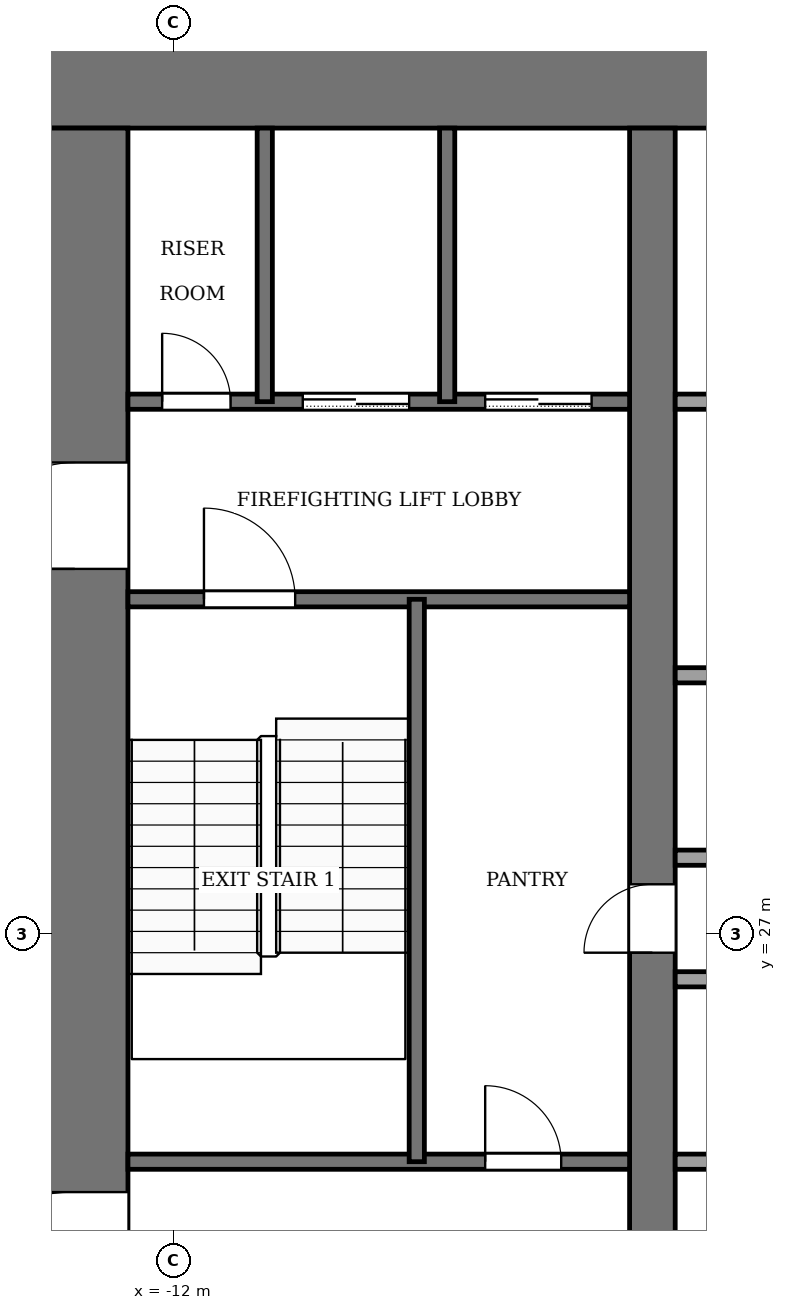
"""IFC4 building model, lengths in metres.
Left out: names, types, materials, properties, quantities, classifications, styles, units other than length and angle.
Written with IfcOpenShell. Run it as: python <this file> out.ifc"""

import sys

from ifc_helpers import new_model, si_unit, direction, frame, frame_2d, origin, place, context, subcontext, project, spatial, rectangle, extrude, element, fill, save


model = new_model("IFC4")
c1 = context("Model", 3, precision=1e-05, world=origin(), true_north=direction((0.0, 1.0)))
c2 = subcontext(c1, "Body", "Model", "MODEL_VIEW")
j1 = project(units=[si_unit("LENGTHUNIT", "METRE"), si_unit("PLANEANGLEUNIT", "RADIAN")], contexts=[c1])
p1 = place(None, origin())
s1 = spatial("IfcSite", under=j1, at=p1, CompositionType="ELEMENT")
p2 = place(p1, origin())
s2 = spatial("IfcBuilding", under=s1, at=p2, CompositionType="ELEMENT")
p3 = place(p2, frame((0.0, 0.0, 42.0)))
s3 = spatial("IfcBuildingStorey", under=s2, at=p3, CompositionType="ELEMENT", Elevation=42.0)
p4 = place(p3, frame((-14.0, 38.3, -0.13), z_axis=(0.0, 0.0, 1.0), x_axis=(1.0, 0.0, 0.0)))
e1 = element("IfcWall", 1, at=p4, inside=s3, PredefinedType="SHEAR", context=c2, shape_type="SweptSolid", body=[
    extrude(rectangle(XDim=28.0, YDim=1.4, at=frame_2d((14.0, 0.0))), origin(), (0.0, 0.0, 1.0), 4.0),
])
p5 = place(p3, frame((-13.3, 18.4, -0.13), z_axis=(0.0, 0.0, 1.0), x_axis=(0.0, 1.0, 0.0)))
e2 = element("IfcWall", 2, at=p5, inside=s3, PredefinedType="SHEAR", context=c2, shape_type="SweptSolid", body=[
    extrude(rectangle(XDim=19.2, YDim=1.4, at=frame_2d((9.6, 0.0))), origin(), (0.0, 0.0, 1.0), 4.0),
])
p6 = place(p5, frame((2.8, 0.0, 0.13)))
e3 = element("IfcOpeningElement", 3, at=p6, cuts=e2, PredefinedType="OPENING", context=c2, shape_type="SweptSolid", body=[
    extrude(rectangle(XDim=2.4, YDim=2.4, at=frame_2d((1.2, 1.2))), frame((0.0, 0.71, 0.0), z_axis=(0.0, -1.0, 0.0), x_axis=(1.0, 0.0, 0.0)), (0.0, 0.0, 1.0), 1.42),
])
p7 = place(p5, frame((13.4, 0.0, 0.13)))
e4 = element("IfcOpeningElement", 4, at=p7, cuts=e2, PredefinedType="OPENING", context=c2, shape_type="SweptSolid", body=[
    extrude(rectangle(XDim=1.4, YDim=2.2, at=frame_2d((0.7, 1.1))), frame((0.0, 0.71, 0.0), z_axis=(0.0, -1.0, 0.0), x_axis=(1.0, 0.0, 0.0)), (0.0, 0.0, 1.0), 1.42),
])
p8 = place(p3, frame((-5.7, 18.4, -0.13), z_axis=(0.0, 0.0, 1.0), x_axis=(0.0, 1.0, 0.0)))
e5 = element("IfcWall", 5, at=p8, inside=s3, PredefinedType="SHEAR", context=c2, shape_type="SweptSolid", body=[
    extrude(rectangle(XDim=19.2, YDim=0.6, at=frame_2d((9.6, 0.0))), origin(), (0.0, 0.0, 1.0), 4.0),
])
p9 = place(p8, frame((8.35, 0.0, 0.13)))
e6 = element("IfcOpeningElement", 6, at=p9, cuts=e5, PredefinedType="OPENING", context=c2, shape_type="SweptSolid", body=[
    extrude(rectangle(XDim=0.9, YDim=2.1, at=frame_2d((0.45, 1.05))), frame((0.0, 0.31, 0.0), z_axis=(0.0, -1.0, 0.0), x_axis=(1.0, 0.0, 0.0)), (0.0, 0.0, 1.0), 0.62),
])
p10 = place(p3, frame((-12.6, 24.0, 0.0), z_axis=(0.0, 0.0, 1.0), x_axis=(1.0, 0.0, 0.0)))
e7 = element("IfcWall", 7, at=p10, inside=s3, PredefinedType="PARTITIONING", context=c2, shape_type="SweptSolid", body=[
    extrude(rectangle(XDim=6.6, YDim=0.2, at=frame_2d((3.3, 0.0))), origin(), (0.0, 0.0, 1.0), 3.87),
])
p11 = place(p10, frame((4.7, 0.0, 0.0)))
e8 = element("IfcOpeningElement", 8, at=p11, cuts=e7, PredefinedType="OPENING", context=c2, shape_type="SweptSolid", body=[
    extrude(rectangle(XDim=1.0, YDim=2.1, at=frame_2d((0.5, 1.05))), frame((0.0, 0.11, 0.0), z_axis=(0.0, -1.0, 0.0), x_axis=(1.0, 0.0, 0.0)), (0.0, 0.0, 1.0), 0.22),
])
p12 = place(p3, frame((-5.4, 24.0, 0.0), z_axis=(0.0, 0.0, 1.0), x_axis=(1.0, 0.0, 0.0)))
e9 = element("IfcWall", 9, at=p12, inside=s3, PredefinedType="PARTITIONING", context=c2, shape_type="SweptSolid", body=[
    extrude(rectangle(XDim=10.8, YDim=0.2, at=frame_2d((5.4, 0.0))), origin(), (0.0, 0.0, 1.0), 3.87),
])
p13 = place(p12, frame((0.75, 0.0, 0.0)))
e10 = element("IfcOpeningElement", 10, at=p13, cuts=e9, PredefinedType="OPENING", context=c2, shape_type="SweptSolid", body=[
    extrude(rectangle(XDim=1.2, YDim=2.2, at=frame_2d((0.6, 1.1))), frame((0.0, 0.11, 0.0), z_axis=(0.0, -1.0, 0.0), x_axis=(1.0, 0.0, 0.0)), (0.0, 0.0, 1.0), 0.22),
])
p14 = place(p12, frame((3.45, 0.0, 0.0)))
e11 = element("IfcOpeningElement", 11, at=p14, cuts=e9, PredefinedType="OPENING", context=c2, shape_type="SweptSolid", body=[
    extrude(rectangle(XDim=1.2, YDim=2.2, at=frame_2d((0.6, 1.1))), frame((0.0, 0.11, 0.0), z_axis=(0.0, -1.0, 0.0), x_axis=(1.0, 0.0, 0.0)), (0.0, 0.0, 1.0), 0.22),
])
p15 = place(p12, frame((6.15, 0.0, 0.0)))
e12 = element("IfcOpeningElement", 12, at=p15, cuts=e9, PredefinedType="OPENING", context=c2, shape_type="SweptSolid", body=[
    extrude(rectangle(XDim=1.2, YDim=2.2, at=frame_2d((0.6, 1.1))), frame((0.0, 0.11, 0.0), z_axis=(0.0, -1.0, 0.0), x_axis=(1.0, 0.0, 0.0)), (0.0, 0.0, 1.0), 0.22),
])
p16 = place(p12, frame((8.85, 0.0, 0.0)))
e13 = element("IfcOpeningElement", 13, at=p16, cuts=e9, PredefinedType="OPENING", context=c2, shape_type="SweptSolid", body=[
    extrude(rectangle(XDim=1.2, YDim=2.2, at=frame_2d((0.6, 1.1))), frame((0.0, 0.11, 0.0), z_axis=(0.0, -1.0, 0.0), x_axis=(1.0, 0.0, 0.0)), (0.0, 0.0, 1.0), 0.22),
])
for number, where, z_axis, x_axis in (
    (14, (-5.4, 26.4, 0.0), (0.0, 0.0, 1.0), (1.0, 0.0, 0.0)),
    (15, (-5.4, 28.0, 0.0), (0.0, 0.0, 1.0), (1.0, 0.0, 0.0)),
    (16, (-5.4, 30.4, 0.0), (0.0, 0.0, 1.0), (1.0, 0.0, 0.0)),
):
    element("IfcWall", number, at=place(p3, frame(where, z_axis=z_axis, x_axis=x_axis)), inside=s3, PredefinedType="PARTITIONING", context=c2, shape_type="SweptSolid", body=[
        extrude(rectangle(XDim=10.8, YDim=0.2, at=frame_2d((5.4, 0.0))), origin(), (0.0, 0.0, 1.0), 3.87),
    ])
p17 = place(p3, frame((-12.6, 31.4, 0.0), z_axis=(0.0, 0.0, 1.0), x_axis=(1.0, 0.0, 0.0)))
e17 = element("IfcWall", 17, at=p17, inside=s3, PredefinedType="PARTITIONING", context=c2, shape_type="SweptSolid", body=[
    extrude(rectangle(XDim=6.6, YDim=0.2, at=frame_2d((3.3, 0.0))), origin(), (0.0, 0.0, 1.0), 3.87),
])
p18 = place(p17, frame((1.0, 0.0, 0.0)))
e18 = element("IfcOpeningElement", 18, at=p18, cuts=e17, PredefinedType="OPENING", context=c2, shape_type="SweptSolid", body=[
    extrude(rectangle(XDim=1.2, YDim=2.2, at=frame_2d((0.6, 1.1))), frame((0.0, 0.11, 0.0), z_axis=(0.0, -1.0, 0.0), x_axis=(1.0, 0.0, 0.0)), (0.0, 0.0, 1.0), 0.22),
])
p19 = place(p3, frame((-12.6, 34.0, 0.0), z_axis=(0.0, 0.0, 1.0), x_axis=(1.0, 0.0, 0.0)))
e19 = element("IfcWall", 19, at=p19, inside=s3, PredefinedType="PARTITIONING", context=c2, shape_type="SweptSolid", body=[
    extrude(rectangle(XDim=6.6, YDim=0.2, at=frame_2d((3.3, 0.0))), origin(), (0.0, 0.0, 1.0), 3.87),
])
p20 = place(p19, frame((4.7, 0.0, 0.0)))
e20 = element("IfcOpeningElement", 20, at=p20, cuts=e19, PredefinedType="OPENING", context=c2, shape_type="SweptSolid", body=[
    extrude(rectangle(XDim=1.4, YDim=2.2, at=frame_2d((0.7, 1.1))), frame((0.0, 0.11, 0.0), z_axis=(0.0, -1.0, 0.0), x_axis=(1.0, 0.0, 0.0)), (0.0, 0.0, 1.0), 0.22),
])
p21 = place(p19, frame((2.3, 0.0, 0.0)))
e21 = element("IfcOpeningElement", 21, at=p21, cuts=e19, PredefinedType="OPENING", context=c2, shape_type="SweptSolid", body=[
    extrude(rectangle(XDim=1.4, YDim=2.2, at=frame_2d((0.7, 1.1))), frame((0.0, 0.11, 0.0), z_axis=(0.0, -1.0, 0.0), x_axis=(1.0, 0.0, 0.0)), (0.0, 0.0, 1.0), 0.22),
])
p22 = place(p19, frame((0.45, 0.0, 0.0)))
e22 = element("IfcOpeningElement", 22, at=p22, cuts=e19, PredefinedType="OPENING", context=c2, shape_type="SweptSolid", body=[
    extrude(rectangle(XDim=0.9, YDim=2.1, at=frame_2d((0.45, 1.05))), frame((0.0, 0.11, 0.0), z_axis=(0.0, -1.0, 0.0), x_axis=(1.0, 0.0, 0.0)), (0.0, 0.0, 1.0), 0.22),
])
p23 = place(p3, frame((-5.4, 34.0, 0.0), z_axis=(0.0, 0.0, 1.0), x_axis=(1.0, 0.0, 0.0)))
e23 = element("IfcWall", 23, at=p23, inside=s3, PredefinedType="PARTITIONING", context=c2, shape_type="SweptSolid", body=[
    extrude(rectangle(XDim=10.8, YDim=0.2, at=frame_2d((5.4, 0.0))), origin(), (0.0, 0.0, 1.0), 3.87),
])
p24 = place(p23, frame((6.15, 0.0, 0.0)))
e24 = element("IfcOpeningElement", 24, at=p24, cuts=e23, PredefinedType="OPENING", context=c2, shape_type="SweptSolid", body=[
    extrude(rectangle(XDim=1.2, YDim=2.2, at=frame_2d((0.6, 1.1))), frame((0.0, 0.11, 0.0), z_axis=(0.0, -1.0, 0.0), x_axis=(1.0, 0.0, 0.0)), (0.0, 0.0, 1.0), 0.22),
])
p25 = place(p23, frame((8.95, 0.0, 0.0)))
e25 = element("IfcOpeningElement", 25, at=p25, cuts=e23, PredefinedType="OPENING", context=c2, shape_type="SweptSolid", body=[
    extrude(rectangle(XDim=1.0, YDim=2.1, at=frame_2d((0.5, 1.05))), frame((0.0, 0.11, 0.0), z_axis=(0.0, -1.0, 0.0), x_axis=(1.0, 0.0, 0.0)), (0.0, 0.0, 1.0), 0.22),
])
p26 = place(p3, frame((-10.8, 34.0, 0.0), z_axis=(0.0, 0.0, 1.0), x_axis=(0.0, 1.0, 0.0)))
e26 = element("IfcWall", 26, at=p26, inside=s3, PredefinedType="PARTITIONING", context=c2, shape_type="SweptSolid", body=[
    extrude(rectangle(XDim=3.6, YDim=0.2, at=frame_2d((1.8, 0.0))), origin(), (0.0, 0.0, 1.0), 3.87),
])
p27 = place(p3, frame((-8.8, 24.0, 0.0), z_axis=(0.0, 0.0, 1.0), x_axis=(0.0, 1.0, 0.0)))
e27 = element("IfcWall", 27, at=p27, inside=s3, PredefinedType="PARTITIONING", context=c2, shape_type="SweptSolid", body=[
    extrude(rectangle(XDim=7.4, YDim=0.2, at=frame_2d((3.7, 0.0))), origin(), (0.0, 0.0, 1.0), 3.87),
])
p28 = place(p3, frame((-8.4, 34.0, 0.0), z_axis=(0.0, 0.0, 1.0), x_axis=(0.0, 1.0, 0.0)))
e28 = element("IfcWall", 28, at=p28, inside=s3, PredefinedType="PARTITIONING", context=c2, shape_type="SweptSolid", body=[
    extrude(rectangle(XDim=3.6, YDim=0.2, at=frame_2d((1.8, 0.0))), origin(), (0.0, 0.0, 1.0), 3.87),
])
p29 = place(p20, origin())
e29 = element("IfcDoor", 29, at=p29, inside=s3, OperationType="SLIDING_TO_LEFT", PredefinedType="DOOR", context=c2, shape_type="SweptSolid", body=[
    extrude(rectangle(XDim=1.4, YDim=2.2, at=frame_2d((0.7, 1.1))), frame((0.0, 0.025, 0.0), z_axis=(0.0, -1.0, 0.0), x_axis=(1.0, 0.0, 0.0)), (0.0, 0.0, 1.0), 0.05),
])
fill(e20, e29)
p30 = place(p21, origin())
e30 = element("IfcDoor", 30, at=p30, inside=s3, OperationType="SLIDING_TO_LEFT", PredefinedType="DOOR", context=c2, shape_type="SweptSolid", body=[
    extrude(rectangle(XDim=1.4, YDim=2.2, at=frame_2d((0.7, 1.1))), frame((0.0, 0.025, 0.0), z_axis=(0.0, -1.0, 0.0), x_axis=(1.0, 0.0, 0.0)), (0.0, 0.0, 1.0), 0.05),
])
fill(e21, e30)
p31 = place(p22, origin())
e31 = element("IfcDoor", 31, at=p31, inside=s3, OperationType="SINGLE_SWING_RIGHT", PredefinedType="DOOR", context=c2, shape_type="SweptSolid", body=[
    extrude(rectangle(XDim=0.9, YDim=2.1, at=frame_2d((0.45, 1.05))), frame((0.0, 0.025, 0.0), z_axis=(0.0, -1.0, 0.0), x_axis=(1.0, 0.0, 0.0)), (0.0, 0.0, 1.0), 0.05),
])
fill(e22, e31)
p32 = place(p11, origin())
e32 = element("IfcDoor", 32, at=p32, inside=s3, OperationType="SINGLE_SWING_LEFT", PredefinedType="DOOR", context=c2, shape_type="SweptSolid", body=[
    extrude(rectangle(XDim=1.0, YDim=2.1, at=frame_2d((0.5, 1.05))), frame((0.0, 0.025, 0.0), z_axis=(0.0, -1.0, 0.0), x_axis=(1.0, 0.0, 0.0)), (0.0, 0.0, 1.0), 0.05),
])
fill(e8, e32)
p33 = place(p9, origin())
e33 = element("IfcDoor", 33, at=p33, inside=s3, OperationType="SINGLE_SWING_RIGHT", PredefinedType="DOOR", context=c2, shape_type="SweptSolid", body=[
    extrude(rectangle(XDim=0.9, YDim=2.1, at=frame_2d((0.45, 1.05))), frame((0.0, 0.025, 0.0), z_axis=(0.0, -1.0, 0.0), x_axis=(1.0, 0.0, 0.0)), (0.0, 0.0, 1.0), 0.05),
])
fill(e6, e33)
p34 = place(p18, origin())
e34 = element("IfcDoor", 34, at=p34, inside=s3, OperationType="SINGLE_SWING_RIGHT", PredefinedType="DOOR", context=c2, shape_type="SweptSolid", body=[
    extrude(rectangle(XDim=1.2, YDim=2.2, at=frame_2d((0.6, 1.1))), frame((0.0, 0.025, 0.0), z_axis=(0.0, -1.0, 0.0), x_axis=(1.0, 0.0, 0.0)), (0.0, 0.0, 1.0), 0.05),
])
fill(e18, e34)
p35 = place(p6, origin())
e35 = element("IfcDoor", 35, at=p35, inside=s3, OperationType="DOUBLE_DOOR_SINGLE_SWING", PredefinedType="DOOR", context=c2, shape_type="SweptSolid", body=[
    extrude(rectangle(XDim=2.4, YDim=2.4, at=frame_2d((1.2, 1.2))), frame((0.0, 0.025, 0.0), z_axis=(0.0, -1.0, 0.0), x_axis=(1.0, 0.0, 0.0)), (0.0, 0.0, 1.0), 0.05),
])
fill(e3, e35)
p36 = place(p7, origin())
e36 = element("IfcDoor", 36, at=p36, inside=s3, OperationType="SINGLE_SWING_RIGHT", PredefinedType="DOOR", context=c2, shape_type="SweptSolid", body=[
    extrude(rectangle(XDim=1.4, YDim=2.2, at=frame_2d((0.7, 1.1))), frame((0.0, 0.025, 0.0), z_axis=(0.0, -1.0, 0.0), x_axis=(1.0, 0.0, 0.0)), (0.0, 0.0, 1.0), 0.05),
])
fill(e4, e36)
save(model, sys.argv[1])
